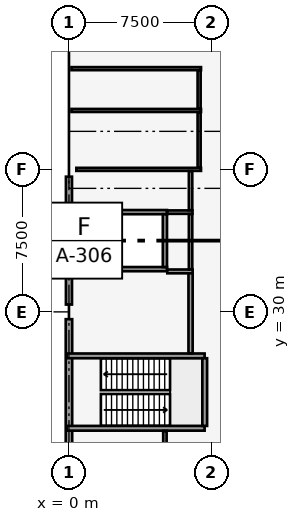
"""IFC4 building model, lengths in metres.
Left out: names, types, materials, properties, quantities, classifications, styles, units other than length and angle.
Written with IfcOpenShell. Run it as: python <this file> out.ifc"""

import sys

from ifc_helpers import new_model, si_unit, direction, frame, frame_2d, origin, origin_2d, place, context, subcontext, project, spatial, rectangle, circle, extrude, element, fill, save


model = new_model("IFC4")
c1 = context("Model", 3, precision=1e-05, world=origin(), true_north=direction((0.0, 1.0)))
c2 = subcontext(c1, "Body", "Model", "MODEL_VIEW")
j1 = project(units=[si_unit("LENGTHUNIT", "METRE"), si_unit("PLANEANGLEUNIT", "RADIAN")], contexts=[c1])
p1 = place(None, origin())
s1 = spatial("IfcSite", under=j1, at=p1, CompositionType="ELEMENT")
p2 = place(p1, origin())
s2 = spatial("IfcBuilding", under=s1, at=p2, CompositionType="ELEMENT")
p3 = place(p2, origin())
s3 = spatial("IfcBuildingStorey", under=s2, at=p3, CompositionType="ELEMENT", Elevation=0.0)
for number, where, z_axis, x_axis in (
    (1, (0.0, 30.0, 0.0), (0.0, 0.0, 1.0), (1.0, 0.0, 0.0)),
    (2, (0.0, 37.5, 0.0), (0.0, 0.0, 1.0), (1.0, 0.0, 0.0)),
):
    element("IfcColumn", number, at=place(p3, frame(where, z_axis=z_axis, x_axis=x_axis)), inside=s3, PredefinedType="COLUMN", context=c2, shape_type="SweptSolid", body=[
        extrude(circle(Radius=0.375, at=origin_2d()), origin(), (0.0, 0.0, 1.0), 4.8),
    ])
p4 = place(p3, frame((0.0, 22.885, 0.0), z_axis=(0.0, 0.0, 1.0), x_axis=(0.0, 1.0, 0.0)))
e3 = element("IfcWall", 3, at=p4, inside=s3, PredefinedType="SOLIDWALL", context=c2, shape_type="SweptSolid", body=[
    extrude(rectangle(XDim=6.73, YDim=0.34, at=frame_2d((3.365, 0.0))), origin(), (0.0, 0.0, 1.0), 2.97),
])
p5 = place(p4, frame((2.152, 0.0, 0.0)))
e4 = element("IfcOpeningElement", 4, at=p5, cuts=e3, PredefinedType="OPENING", context=c2, shape_type="SweptSolid", body=[
    extrude(rectangle(XDim=1.8, YDim=2.2, at=frame_2d((0.9, 1.1))), frame((0.0, 0.18, 0.0), z_axis=(0.0, -1.0, 0.0), x_axis=(1.0, 0.0, 0.0)), (0.0, 0.0, 1.0), 0.36),
])
p6 = place(p3, frame((0.0, 30.385, 0.0), z_axis=(0.0, 0.0, 1.0), x_axis=(0.0, 1.0, 0.0)))
e5 = element("IfcWall", 5, at=p6, inside=s3, PredefinedType="SOLIDWALL", context=c2, shape_type="SweptSolid", body=[
    extrude(rectangle(XDim=6.73, YDim=0.32, at=frame_2d((3.365, 0.0))), origin(), (0.0, 0.0, 1.0), 2.97),
])
p7 = place(p3, frame((-0.12, 23.875, 0.0), z_axis=(0.0, 0.0, 1.0), x_axis=(1.0, 0.0, 0.0)))
e6 = element("IfcWall", 6, at=p7, inside=s3, PredefinedType="SOLIDWALL", context=c2, shape_type="SweptSolid", body=[
    extrude(rectangle(XDim=7.26, YDim=0.25, at=frame_2d((3.63, 0.0))), origin(), (0.0, 0.0, 1.0), 4.5),
])
p8 = place(p3, frame((-0.12, 27.685, 0.0), z_axis=(0.0, 0.0, 1.0), x_axis=(1.0, 0.0, 0.0)))
e7 = element("IfcWall", 7, at=p8, inside=s3, PredefinedType="SOLIDWALL", context=c2, shape_type="SweptSolid", body=[
    extrude(rectangle(XDim=7.26, YDim=0.25, at=frame_2d((3.63, 0.0))), origin(), (0.0, 0.0, 1.0), 4.5),
])
p9 = place(p8, frame((0.45, 0.0, 0.0)))
e8 = element("IfcOpeningElement", 8, at=p9, cuts=e7, PredefinedType="OPENING", context=c2, shape_type="SweptSolid", body=[
    extrude(rectangle(XDim=1.1, YDim=2.15, at=frame_2d((0.55, 1.075))), frame((0.0, 0.135, 0.0), z_axis=(0.0, -1.0, 0.0), x_axis=(1.0, 0.0, 0.0)), (0.0, 0.0, 1.0), 0.27),
])
p10 = place(p3, frame((7.145, 24.0, 0.0), z_axis=(0.0, 0.0, 1.0), x_axis=(0.0, 1.0, 0.0)))
e9 = element("IfcWall", 9, at=p10, inside=s3, PredefinedType="SOLIDWALL", context=c2, shape_type="SweptSolid", body=[
    extrude(rectangle(XDim=3.56, YDim=0.25, at=frame_2d((1.78, 0.0))), origin(), (0.0, 0.0, 1.0), 4.5),
])
p11 = place(p3, frame((2.34, 32.25, 0.0), z_axis=(0.0, 0.0, 1.0), x_axis=(1.0, 0.0, 0.0)))
e10 = element("IfcWall", 10, at=p11, inside=s3, PredefinedType="SOLIDWALL", context=c2, shape_type="SweptSolid", body=[
    extrude(rectangle(XDim=2.82, YDim=0.22, at=frame_2d((1.41, 0.0))), origin(), (0.0, 0.0, 1.0), 4.5),
])
p12 = place(p11, frame((0.86, 0.0, 0.0)))
e11 = element("IfcOpeningElement", 11, at=p12, cuts=e10, PredefinedType="OPENING", context=c2, shape_type="SweptSolid", body=[
    extrude(rectangle(XDim=1.1, YDim=2.15, at=frame_2d((0.55, 1.075))), frame((0.0, 0.12, 0.0), z_axis=(0.0, -1.0, 0.0), x_axis=(1.0, 0.0, 0.0)), (0.0, 0.0, 1.0), 0.24),
])
p13 = place(p3, frame((2.34, 35.25, 0.0), z_axis=(0.0, 0.0, 1.0), x_axis=(1.0, 0.0, 0.0)))
e12 = element("IfcWall", 12, at=p13, inside=s3, PredefinedType="SOLIDWALL", context=c2, shape_type="SweptSolid", body=[
    extrude(rectangle(XDim=2.82, YDim=0.22, at=frame_2d((1.41, 0.0))), origin(), (0.0, 0.0, 1.0), 4.5),
])
for number, where, z_axis, x_axis in (
    (13, (2.45, 32.36, 0.0), (0.0, 0.0, 1.0), (0.0, 1.0, 0.0)),
    (14, (5.05, 32.36, 0.0), (0.0, 0.0, 1.0), (0.0, 1.0, 0.0)),
):
    element("IfcWall", number, at=place(p3, frame(where, z_axis=z_axis, x_axis=x_axis)), inside=s3, PredefinedType="SOLIDWALL", context=c2, shape_type="SweptSolid", body=[
        extrude(rectangle(XDim=2.78, YDim=0.22, at=frame_2d((1.39, 0.0))), origin(), (0.0, 0.0, 1.0), 4.5),
    ])
p14 = place(p3, frame((6.4, 27.82, 0.0), z_axis=(0.0, 0.0, 1.0), x_axis=(0.0, 1.0, 0.0)))
e15 = element("IfcWall", 15, at=p14, inside=s3, PredefinedType="SOLIDWALL", context=c2, shape_type="SweptSolid", body=[
    extrude(rectangle(XDim=4.31, YDim=0.22, at=frame_2d((2.155, 0.0))), origin(), (0.0, 0.0, 1.0), 4.5),
])
p15 = place(p14, frame((0.45, 0.0, 0.0)))
e16 = element("IfcOpeningElement", 16, at=p15, cuts=e15, PredefinedType="OPENING", context=c2, shape_type="SweptSolid", body=[
    extrude(rectangle(XDim=1.1, YDim=2.15, at=frame_2d((0.55, 1.075))), frame((0.0, 0.12, 0.0), z_axis=(0.0, -1.0, 0.0), x_axis=(1.0, 0.0, 0.0)), (0.0, 0.0, 1.0), 0.24),
])
p16 = place(p3, frame((0.18, 32.13, 0.0), z_axis=(0.0, 0.0, 1.0), x_axis=(1.0, 0.0, 0.0)))
e17 = element("IfcWall", 17, at=p16, inside=s3, PredefinedType="PARTITIONING", context=c2, shape_type="SweptSolid", body=[
    extrude(rectangle(XDim=2.145, YDim=0.2, at=frame_2d((1.073, 0.0))), origin(), (0.0, 0.0, 1.0), 3.88),
])
p17 = place(p3, frame((5.175, 32.13, 0.0), z_axis=(0.0, 0.0, 1.0), x_axis=(1.0, 0.0, 0.0)))
e18 = element("IfcWall", 18, at=p17, inside=s3, PredefinedType="PARTITIONING", context=c2, shape_type="SweptSolid", body=[
    extrude(rectangle(XDim=1.335, YDim=0.2, at=frame_2d((0.667, 0.0))), origin(), (0.0, 0.0, 1.0), 3.93),
])
p18 = place(p3, frame((5.05, 20.274, 0.0), z_axis=(0.0, 0.0, 1.0), x_axis=(0.0, 1.0, 0.0)))
e19 = element("IfcWall", 19, at=p18, inside=s3, PredefinedType="PARTITIONING", context=c2, shape_type="SweptSolid", body=[
    extrude(rectangle(XDim=3.462, YDim=0.18, at=frame_2d((1.731, 0.0))), origin(), (0.0, 0.0, 1.0), 2.97),
])
p19 = place(p3, frame((0.174, 35.25, 0.0), z_axis=(0.0, 0.0, 1.0), x_axis=(1.0, 0.0, 0.0)))
e20 = element("IfcWall", 20, at=p19, inside=s3, PredefinedType="PARTITIONING", context=c2, shape_type="SweptSolid", body=[
    extrude(rectangle(XDim=2.166, YDim=0.18, at=frame_2d((1.083, 0.0))), origin(), (0.0, 0.0, 1.0), 3.87),
])
p20 = place(p3, frame((5.16, 35.25, 0.0), z_axis=(0.0, 0.0, 1.0), x_axis=(1.0, 0.0, 0.0)))
e21 = element("IfcWall", 21, at=p20, inside=s3, PredefinedType="PARTITIONING", context=c2, shape_type="SweptSolid", body=[
    extrude(rectangle(XDim=1.34, YDim=0.18, at=frame_2d((0.67, 0.0))), origin(), (0.0, 0.0, 1.0), 3.87),
])
p21 = place(p3, frame((0.389, 37.5, 0.0), z_axis=(0.0, 0.0, 1.0), x_axis=(1.0, 0.0, 0.0)))
e22 = element("IfcWall", 22, at=p21, inside=s3, PredefinedType="PARTITIONING", context=c2, shape_type="SweptSolid", body=[
    extrude(rectangle(XDim=6.561, YDim=0.16, at=frame_2d((3.281, 0.0))), origin(), (0.0, 0.0, 1.0), 2.97),
])
p22 = place(p3, frame((6.4, 32.244, 0.0), z_axis=(0.0, 0.0, 1.0), x_axis=(0.0, 1.0, 0.0)))
e23 = element("IfcWall", 23, at=p22, inside=s3, PredefinedType="PARTITIONING", context=c2, shape_type="SweptSolid", body=[
    extrude(rectangle(XDim=2.902, YDim=0.18, at=frame_2d((1.451, 0.0))), origin(), (0.0, 0.0, 1.0), 3.87),
])
p23 = place(p3, frame((6.4, 35.354, 0.0), z_axis=(0.0, 0.0, 1.0), x_axis=(0.0, 1.0, 0.0)))
e24 = element("IfcWall", 24, at=p23, inside=s3, PredefinedType="PARTITIONING", context=c2, shape_type="SweptSolid", body=[
    extrude(rectangle(XDim=2.052, YDim=0.18, at=frame_2d((1.026, 0.0))), origin(), (0.0, 0.0, 1.0), 2.97),
])
p24 = place(p23, frame((0.546, 0.0, 0.0)))
e25 = element("IfcOpeningElement", 25, at=p24, cuts=e24, PredefinedType="OPENING", context=c2, shape_type="SweptSolid", body=[
    extrude(rectangle(XDim=0.9, YDim=2.1, at=frame_2d((0.45, 1.05))), frame((0.0, 0.1, 0.0), z_axis=(0.0, -1.0, 0.0), x_axis=(1.0, 0.0, 0.0)), (0.0, 0.0, 1.0), 0.2),
])
for number, where, z_axis, x_axis in (
    (26, (0.132, 40.6, 0.0), (0.0, 0.0, 1.0), (1.0, 0.0, 0.0)),
    (27, (0.132, 42.8, 0.0), (0.0, 0.0, 1.0), (1.0, 0.0, 0.0)),
):
    element("IfcWall", number, at=place(p3, frame(where, z_axis=z_axis, x_axis=x_axis)), inside=s3, PredefinedType="PARTITIONING", context=c2, shape_type="SweptSolid", body=[
        extrude(rectangle(XDim=6.818, YDim=0.16, at=frame_2d((3.409, 0.0))), origin(), (0.0, 0.0, 1.0), 3.72),
    ])
p25 = place(p3, frame((6.85, 37.594, 0.0), z_axis=(0.0, 0.0, 1.0), x_axis=(0.0, 1.0, 0.0)))
e28 = element("IfcWall", 28, at=p25, inside=s3, PredefinedType="PARTITIONING", context=c2, shape_type="SweptSolid", body=[
    extrude(rectangle(XDim=2.912, YDim=0.16, at=frame_2d((1.456, 0.0))), origin(), (0.0, 0.0, 1.0), 2.97),
])
p26 = place(p25, frame((0.981, 0.0, 0.0)))
e29 = element("IfcOpeningElement", 29, at=p26, cuts=e28, PredefinedType="OPENING", context=c2, shape_type="SweptSolid", body=[
    extrude(rectangle(XDim=0.95, YDim=2.1, at=frame_2d((0.475, 1.05))), frame((0.0, 0.09, 0.0), z_axis=(0.0, -1.0, 0.0), x_axis=(1.0, 0.0, 0.0)), (0.0, 0.0, 1.0), 0.18),
])
p27 = place(p3, frame((6.85, 40.694, 0.0), z_axis=(0.0, 0.0, 1.0), x_axis=(0.0, 1.0, 0.0)))
e30 = element("IfcWall", 30, at=p27, inside=s3, PredefinedType="PARTITIONING", context=c2, shape_type="SweptSolid", body=[
    extrude(rectangle(XDim=2.012, YDim=0.16, at=frame_2d((1.006, 0.0))), origin(), (0.0, 0.0, 1.0), 3.87),
])
p28 = place(p27, frame((0.556, 0.0, 0.0)))
e31 = element("IfcOpeningElement", 31, at=p28, cuts=e30, PredefinedType="OPENING", context=c2, shape_type="SweptSolid", body=[
    extrude(rectangle(XDim=0.9, YDim=2.1, at=frame_2d((0.45, 1.05))), frame((0.0, 0.09, 0.0), z_axis=(0.0, -1.0, 0.0), x_axis=(1.0, 0.0, 0.0)), (0.0, 0.0, 1.0), 0.18),
])
p29 = place(p5, origin())
e32 = element("IfcDoor", 32, at=p29, inside=s3, OperationType="SINGLE_SWING_LEFT", PredefinedType="DOOR", context=c2, shape_type="SweptSolid", body=[
    extrude(rectangle(XDim=1.8, YDim=2.2, at=frame_2d((0.9, 1.1))), frame((0.0, 0.025, 0.0), z_axis=(0.0, -1.0, 0.0), x_axis=(1.0, 0.0, 0.0)), (0.0, 0.0, 1.0), 0.05),
])
fill(e4, e32)
p30 = place(p9, origin())
e33 = element("IfcDoor", 33, at=p30, inside=s3, OperationType="SINGLE_SWING_RIGHT", PredefinedType="DOOR", context=c2, shape_type="SweptSolid", body=[
    extrude(rectangle(XDim=1.1, YDim=2.15, at=frame_2d((0.55, 1.075))), frame((0.0, 0.025, 0.0), z_axis=(0.0, -1.0, 0.0), x_axis=(1.0, 0.0, 0.0)), (0.0, 0.0, 1.0), 0.05),
])
fill(e8, e33)
p31 = place(p12, origin())
e34 = element("IfcDoor", 34, at=p31, inside=s3, OperationType="SLIDING_TO_LEFT", PredefinedType="DOOR", context=c2, shape_type="SweptSolid", body=[
    extrude(rectangle(XDim=1.1, YDim=2.15, at=frame_2d((0.55, 1.075))), frame((0.0, 0.025, 0.0), z_axis=(0.0, -1.0, 0.0), x_axis=(1.0, 0.0, 0.0)), (0.0, 0.0, 1.0), 0.05),
])
fill(e11, e34)
p32 = place(p15, origin())
e35 = element("IfcDoor", 35, at=p32, inside=s3, OperationType="SINGLE_SWING_RIGHT", PredefinedType="DOOR", context=c2, shape_type="SweptSolid", body=[
    extrude(rectangle(XDim=1.1, YDim=2.15, at=frame_2d((0.55, 1.075))), frame((0.0, 0.025, 0.0), z_axis=(0.0, -1.0, 0.0), x_axis=(1.0, 0.0, 0.0)), (0.0, 0.0, 1.0), 0.05),
])
fill(e16, e35)
p33 = place(p24, origin())
e36 = element("IfcDoor", 36, at=p33, inside=s3, OperationType="SINGLE_SWING_LEFT", PredefinedType="DOOR", context=c2, shape_type="SweptSolid", body=[
    extrude(rectangle(XDim=0.9, YDim=2.1, at=frame_2d((0.45, 1.05))), frame((0.0, 0.025, 0.0), z_axis=(0.0, -1.0, 0.0), x_axis=(1.0, 0.0, 0.0)), (0.0, 0.0, 1.0), 0.05),
])
fill(e25, e36)
p34 = place(p26, origin())
e37 = element("IfcDoor", 37, at=p34, inside=s3, OperationType="SINGLE_SWING_RIGHT", PredefinedType="DOOR", context=c2, shape_type="SweptSolid", body=[
    extrude(rectangle(XDim=0.95, YDim=2.1, at=frame_2d((0.475, 1.05))), frame((0.0, 0.025, 0.0), z_axis=(0.0, -1.0, 0.0), x_axis=(1.0, 0.0, 0.0)), (0.0, 0.0, 1.0), 0.05),
])
fill(e29, e37)
p35 = place(p28, origin())
e38 = element("IfcDoor", 38, at=p35, inside=s3, OperationType="SINGLE_SWING_LEFT", PredefinedType="DOOR", context=c2, shape_type="SweptSolid", body=[
    extrude(rectangle(XDim=0.9, YDim=2.1, at=frame_2d((0.45, 1.05))), frame((0.0, 0.025, 0.0), z_axis=(0.0, -1.0, 0.0), x_axis=(1.0, 0.0, 0.0)), (0.0, 0.0, 1.0), 0.05),
])
fill(e31, e38)
save(model, sys.argv[1])
